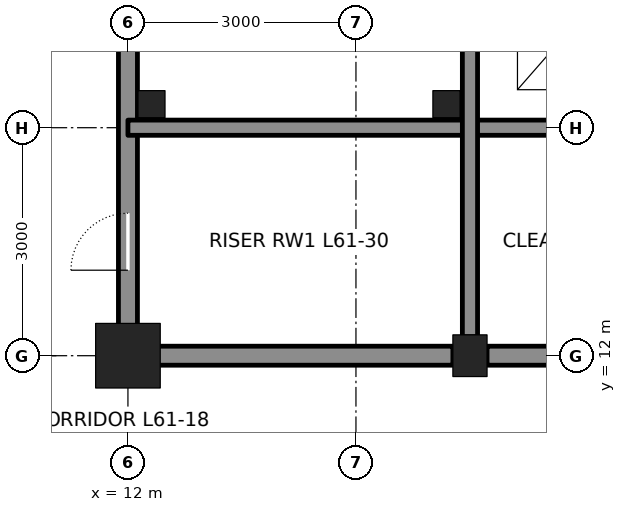
"""IFC4 building model, lengths in metres.
Left out: names, types, materials, properties, quantities, classifications, styles, units other than length and angle.
Written with IfcOpenShell. Run it as: python <this file> out.ifc"""

import sys

from ifc_helpers import new_model, si_unit, direction, frame, frame_2d, origin, origin_2d, place, context, subcontext, project, spatial, rectangle, hollow_rectangle, i_section, extrude, element, fill, save


model = new_model("IFC4")
c1 = context("Model", 3, precision=1e-05, world=origin(), true_north=direction((0.0, 1.0)))
c2 = subcontext(c1, "Body", "Model", "MODEL_VIEW")
j1 = project(units=[si_unit("LENGTHUNIT", "METRE"), si_unit("PLANEANGLEUNIT", "RADIAN")], contexts=[c1])
p1 = place(None, origin())
s1 = spatial("IfcSite", under=j1, at=p1, CompositionType="ELEMENT")
p2 = place(p1, origin())
s2 = spatial("IfcBuilding", under=s1, at=p2, CompositionType="ELEMENT")
p3 = place(p2, frame((0.0, 0.0, 274.8)))
s3 = spatial("IfcBuildingStorey", under=s2, at=p3, CompositionType="ELEMENT", Elevation=274.8)
p4 = place(p3, frame((12.0, 12.0, 0.0), z_axis=(0.0, 0.0, 1.0), x_axis=(1.0, 0.0, 0.0)))
e1 = element("IfcColumn", 1, at=p4, inside=s3, PredefinedType="COLUMN", context=c2, shape_type="SweptSolid", body=[
    extrude(hollow_rectangle(XDim=0.85, YDim=0.85, WallThickness=0.085, at=origin_2d()), origin(), (0.0, 0.0, 1.0), 4.2),
])
p5 = place(p3, frame((16.5, 12.0, 0.0), z_axis=(0.0, 0.0, 1.0), x_axis=(1.0, 0.0, 0.0)))
e2 = element("IfcColumn", 2, at=p5, inside=s3, PredefinedType="COLUMN", context=c2, shape_type="SweptSolid", body=[
    extrude(i_section(OverallWidth=0.449, OverallDepth=0.549, WebThickness=0.072, FlangeThickness=0.115, at=origin_2d()), origin(), (0.0, 0.0, 1.0), 4.2),
])
p6 = place(p3, frame((12.0, 12.25, 0.0), z_axis=(0.0, 0.0, 1.0), x_axis=(0.0, 1.0, 0.0)))
e3 = element("IfcWall", 3, at=p6, inside=s3, PredefinedType="SOLIDWALL", context=c2, shape_type="SweptSolid", body=[
    extrude(rectangle(XDim=8.5, YDim=0.25, at=frame_2d((4.25, 0.0))), origin(), (0.0, 0.0, 1.0), 3.113),
])
p7 = place(p6, frame((0.875, 0.0, 0.0)))
e4 = element("IfcOpeningElement", 4, at=p7, cuts=e3, PredefinedType="OPENING", context=c2, shape_type="SweptSolid", body=[
    extrude(rectangle(XDim=0.75, YDim=2.1, at=frame_2d((0.375, 1.05))), frame((0.0, 0.135, 0.0), z_axis=(0.0, -1.0, 0.0), x_axis=(1.0, 0.0, 0.0)), (0.0, 0.0, 1.0), 0.27),
])
p8 = place(p3, frame((12.25, 12.0, 0.0), z_axis=(0.0, 0.0, 1.0), x_axis=(1.0, 0.0, 0.0)))
e5 = element("IfcWall", 5, at=p8, inside=s3, PredefinedType="SOLIDWALL", context=c2, shape_type="SweptSolid", body=[
    extrude(rectangle(XDim=4.025, YDim=0.25, at=frame_2d((2.013, 0.0))), origin(), (0.0, 0.0, 1.0), 3.181),
])
p9 = place(p3, frame((16.725, 12.0, 0.0), z_axis=(0.0, 0.0, 1.0), x_axis=(1.0, 0.0, 0.0)))
e6 = element("IfcWall", 6, at=p9, inside=s3, PredefinedType="SOLIDWALL", context=c2, shape_type="SweptSolid", body=[
    extrude(rectangle(XDim=2.55, YDim=0.25, at=frame_2d((1.275, 0.0))), origin(), (0.0, 0.0, 1.0), 3.181),
])
p10 = place(p3, frame((12.0, 15.0, 0.0), z_axis=(0.0, 0.0, 1.0), x_axis=(1.0, 0.0, 0.0)))
e7 = element("IfcWall", 7, at=p10, inside=s3, PredefinedType="SOLIDWALL", context=c2, shape_type="SweptSolid", body=[
    extrude(rectangle(XDim=7.5, YDim=0.2, at=frame_2d((3.75, 0.0))), origin(), (0.0, 0.0, 1.0), 4.04),
])
p11 = place(p3, frame((16.5, 12.25, 0.0), z_axis=(0.0, 0.0, 1.0), x_axis=(0.0, 1.0, 0.0)))
e8 = element("IfcWall", 8, at=p11, inside=s3, PredefinedType="SOLIDWALL", context=c2, shape_type="SweptSolid", body=[
    extrude(rectangle(XDim=8.5, YDim=0.2, at=frame_2d((4.25, 0.0))), origin(), (0.0, 0.0, 1.0), 3.113),
])
for number, where, z_axis, x_axis in (
    (9, (12.31, 15.31, 0.0), (0.0, 0.0, 1.0), (1.0, 0.0, 0.0)),
    (10, (16.19, 15.31, 0.0), (0.0, 0.0, 1.0), (1.0, 0.0, 0.0)),
):
    element("IfcColumn", number, at=place(p3, frame(where, z_axis=z_axis, x_axis=x_axis)), inside=s3, PredefinedType="COLUMN", context=c2, shape_type="SweptSolid", body=[
        extrude(hollow_rectangle(XDim=0.356, YDim=0.356, WallThickness=0.009, at=origin_2d()), origin(), (0.0, 0.0, 1.0), 4.2),
    ])
p12 = place(p7, origin())
e11 = element("IfcDoor", 11, at=p12, inside=s3, OperationType="SINGLE_SWING_LEFT", PredefinedType="DOOR", context=c2, shape_type="SweptSolid", body=[
    extrude(rectangle(XDim=0.75, YDim=2.1, at=frame_2d((0.375, 1.05))), frame((0.0, 0.025, 0.0), z_axis=(0.0, -1.0, 0.0), x_axis=(1.0, 0.0, 0.0)), (0.0, 0.0, 1.0), 0.05),
])
fill(e4, e11)
save(model, sys.argv[1])
